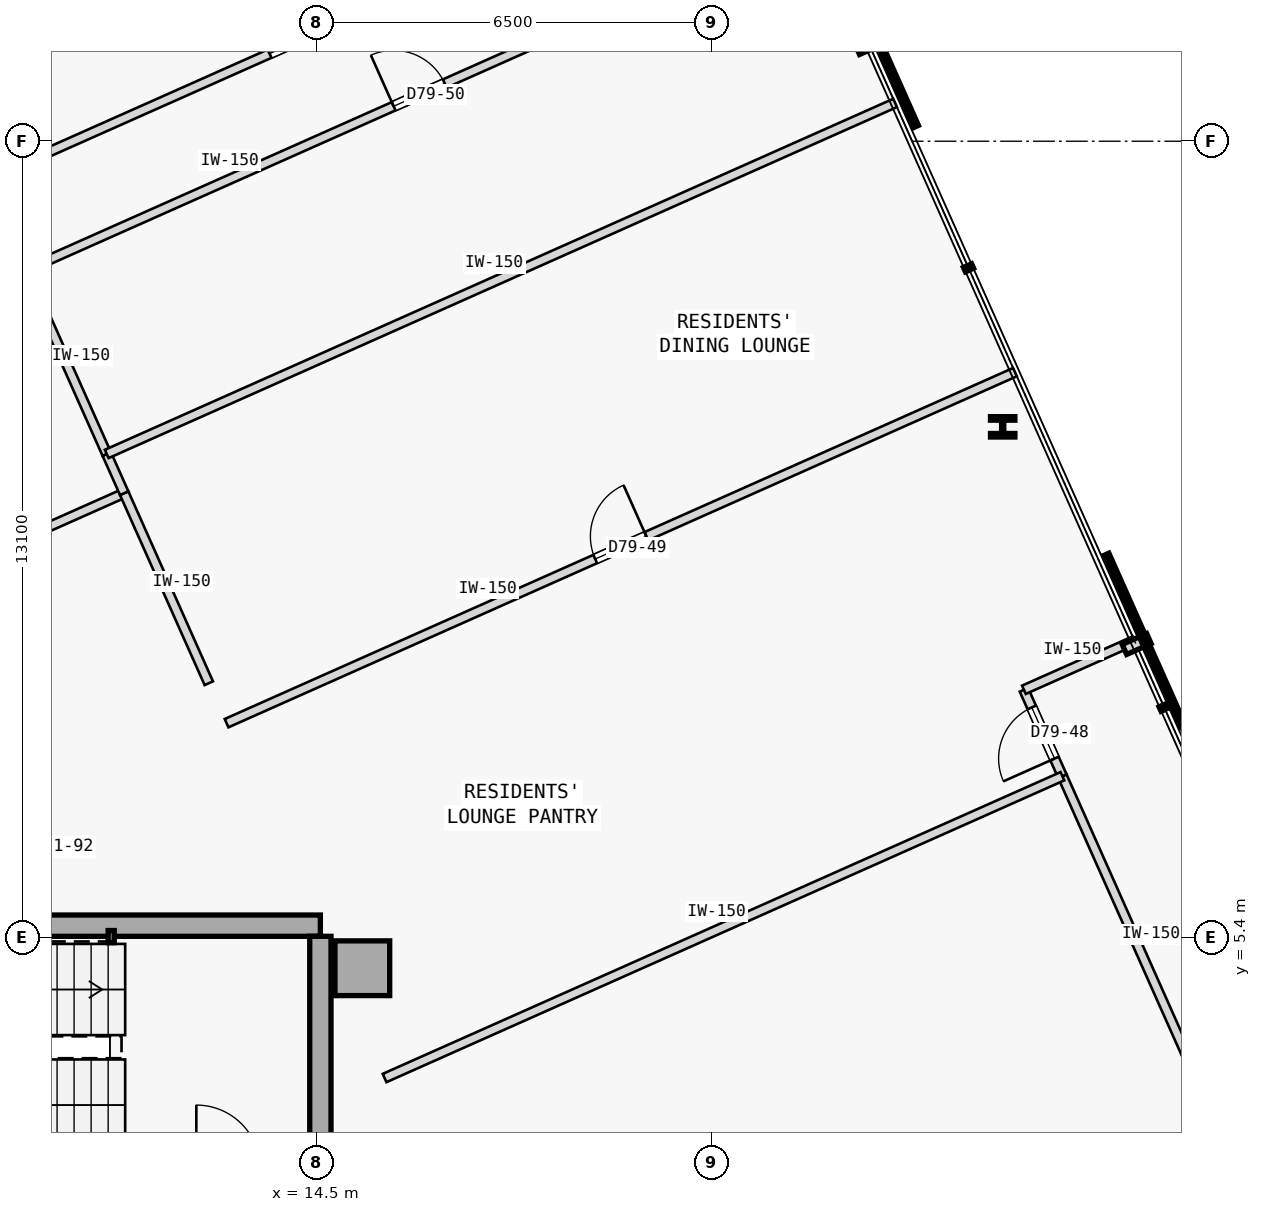
"""IFC4 building model, lengths in metres.
Left out: names, types, materials, properties, quantities, classifications, styles, units other than length and angle.
Written with IfcOpenShell. Run it as: python <this file> out.ifc"""

import sys

from ifc_helpers import new_model, si_unit, direction, frame, frame_2d, origin, origin_2d, place, context, subcontext, project, spatial, rectangle, hollow_rectangle, i_section, extrude, element, fill, save


model = new_model("IFC4")
c1 = context("Model", 3, precision=1e-05, world=origin(), true_north=direction((0.0, 1.0)))
c2 = subcontext(c1, "Body", "Model", "MODEL_VIEW")
j1 = project(units=[si_unit("LENGTHUNIT", "METRE"), si_unit("PLANEANGLEUNIT", "RADIAN")], contexts=[c1])
p1 = place(None, origin())
s1 = spatial("IfcSite", under=j1, at=p1, CompositionType="ELEMENT")
p2 = place(p1, origin())
s2 = spatial("IfcBuilding", under=s1, at=p2, CompositionType="ELEMENT")
p3 = place(p2, frame((0.0, 0.0, 295.3)))
s3 = spatial("IfcBuildingStorey", under=s2, at=p3, CompositionType="ELEMENT", Elevation=295.3)
p4 = place(p3, frame((15.25, 4.9, 0.0), z_axis=(0.0, 0.0, 1.0), x_axis=(1.0, 0.0, 0.0)))
e1 = element("IfcColumn", 1, at=p4, inside=s3, PredefinedType="COLUMN", context=c2, shape_type="SweptSolid", body=[
    extrude(rectangle(XDim=0.9, YDim=0.9, at=origin_2d()), origin(), (0.0, 0.0, 1.0), 3.35),
])
p5 = place(p3, frame((3.15, 5.6, 0.0), z_axis=(0.0, 0.0, 1.0), x_axis=(1.0, 0.0, 0.0)))
e2 = element("IfcWall", 2, at=p5, inside=s3, PredefinedType="SHEAR", context=c2, shape_type="SweptSolid", body=[
    extrude(rectangle(XDim=11.41, YDim=0.35, at=frame_2d((5.705, 0.0))), origin(), (0.0, 0.0, 1.0), 3.125),
])
p6 = place(p3, frame((14.56, -5.425, 0.0), z_axis=(0.0, 0.0, 1.0), x_axis=(0.0, 1.0, 0.0)))
e3 = element("IfcWall", 3, at=p6, inside=s3, PredefinedType="SHEAR", context=c2, shape_type="SweptSolid", body=[
    extrude(rectangle(XDim=10.85, YDim=0.35, at=frame_2d((5.425, 0.0))), origin(), (0.0, 0.0, 1.0), 3.125),
])
p7 = place(p3, frame((11.12, 5.42, 0.0), z_axis=(0.0, 0.0, 1.0), x_axis=(1.0, 0.0, 0.0)))
e4 = element("IfcColumn", 4, at=p7, inside=s3, PredefinedType="COLUMN", context=c2, shape_type="SweptSolid", body=[
    extrude(hollow_rectangle(XDim=0.1, YDim=0.2, WallThickness=0.008, at=origin_2d()), origin(), (0.0, 0.0, 1.0), 3.35),
])
p8 = place(p3, frame((25.781, 13.803, 0.0), z_axis=(0.0, 0.0, 1.0), x_axis=(1.0, 0.0, 0.0)))
e5 = element("IfcColumn", 5, at=p8, inside=s3, PredefinedType="COLUMN", context=c2, shape_type="SweptSolid", body=[
    extrude(i_section(OverallWidth=0.401, OverallDepth=0.335, WebThickness=0.036, FlangeThickness=0.058, FilletRadius=0.015, at=origin_2d()), origin(), (0.0, 0.0, 1.0), 3.35),
])
p9 = place(p3, frame((6.31, 16.638, 0.0), z_axis=(0.0, 0.0, 1.0), x_axis=(0.913550659227, 0.406724959925, 0.0)))
e6 = element("IfcWall", 6, at=p9, inside=s3, PredefinedType="PARTITIONING", context=c2, shape_type="SweptSolid", body=[
    extrude(rectangle(XDim=17.185, YDim=0.15, at=frame_2d((8.592, 0.0))), origin(), (0.0, 0.0, 1.0), 3.125),
])
p10 = place(p9, frame((8.117, 0.0, 0.0)))
e7 = element("IfcOpeningElement", 7, at=p10, cuts=e6, PredefinedType="OPENING", context=c2, shape_type="SweptSolid", body=[
    extrude(rectangle(XDim=0.95, YDim=2.15, at=frame_2d((0.475, 1.075))), frame((0.0, 0.085, 0.0), z_axis=(0.0, -1.0, 0.0), x_axis=(1.0, 0.0, 0.0)), (0.0, 0.0, 1.0), 0.17),
])
p11 = place(p3, frame((29.809, 1.216, 0.0), z_axis=(0.0, 0.0, 1.0), x_axis=(-0.406719136744, 0.913553251763, 0.0)))
e8 = element("IfcWall", 8, at=p11, inside=s3, PredefinedType="PARTITIONING", context=c2, shape_type="SweptSolid", body=[
    extrude(rectangle(XDim=7.489, YDim=0.15, at=frame_2d((3.745, 0.0))), origin(), (0.0, 0.0, 1.0), 3.125),
])
p12 = place(p3, frame((26.763, 8.057, 0.0), z_axis=(0.0, 0.0, 1.0), x_axis=(-0.406851688687, 0.913494227356, 0.0)))
e9 = element("IfcWall", 9, at=p12, inside=s3, PredefinedType="PARTITIONING", context=c2, shape_type="SweptSolid", body=[
    extrude(rectangle(XDim=1.556, YDim=0.15, at=frame_2d((0.778, 0.0))), origin(), (0.0, 0.0, 1.0), 3.125),
])
p13 = place(p12, frame((0.318, 0.0, 0.0)))
e10 = element("IfcOpeningElement", 10, at=p13, cuts=e9, PredefinedType="OPENING", context=c2, shape_type="SweptSolid", body=[
    extrude(rectangle(XDim=0.92, YDim=2.15, at=frame_2d((0.46, 1.075))), frame((0.0, 0.085, 0.0), z_axis=(0.0, -1.0, 0.0), x_axis=(1.0, 0.0, 0.0)), (0.0, 0.0, 1.0), 0.17),
])
p14 = place(p3, frame((26.13, 9.479, 0.0), z_axis=(0.0, 0.0, 1.0), x_axis=(0.913573626813, 0.406673368186, 0.0)))
e11 = element("IfcWall", 11, at=p14, inside=s3, PredefinedType="PARTITIONING", context=c2, shape_type="SweptSolid", body=[
    extrude(rectangle(XDim=1.99, YDim=0.15, at=frame_2d((0.995, 0.0))), origin(), (0.0, 0.0, 1.0), 3.125),
])
p15 = place(p3, frame((9.703, 16.375, 0.0), z_axis=(0.0, 0.0, 1.0), x_axis=(0.913544622417, 0.406738519018, 0.0)))
e12 = element("IfcWall", 12, at=p15, inside=s3, PredefinedType="PARTITIONING", context=c2, shape_type="SweptSolid", body=[
    extrude(rectangle(XDim=14.192, YDim=0.15, at=frame_2d((7.096, 0.0))), origin(), (0.0, 0.0, 1.0), 3.125),
])
p16 = place(p15, frame((6.636, 0.0, 0.0)))
e13 = element("IfcOpeningElement", 13, at=p16, cuts=e12, PredefinedType="OPENING", context=c2, shape_type="SweptSolid", body=[
    extrude(rectangle(XDim=0.92, YDim=2.15, at=frame_2d((0.46, 1.075))), frame((0.0, 0.085, 0.0), z_axis=(0.0, -1.0, 0.0), x_axis=(1.0, 0.0, 0.0)), (0.0, 0.0, 1.0), 0.17),
])
p17 = place(p3, frame((3.7, 9.313, 0.0), z_axis=(0.0, 0.0, 1.0), x_axis=(0.913545080962, 0.406737489112, 0.0)))
e14 = element("IfcWall", 14, at=p17, inside=s3, PredefinedType="PARTITIONING", context=c2, shape_type="SweptSolid", body=[
    extrude(rectangle(XDim=8.356, YDim=0.15, at=frame_2d((4.178, 0.0))), origin(), (0.0, 0.0, 1.0), 3.125),
])
p18 = place(p3, frame((12.725, 9.587, 0.0), z_axis=(0.0, 0.0, 1.0), x_axis=(-0.406714462948, 0.913555332549, 0.0)))
e15 = element("IfcWall", 15, at=p18, inside=s3, PredefinedType="PARTITIONING", context=c2, shape_type="SweptSolid", body=[
    extrude(rectangle(XDim=3.421, YDim=0.15, at=frame_2d((1.71, 0.0))), origin(), (0.0, 0.0, 1.0), 3.125),
])
p19 = place(p3, frame((11.334, 12.712, 0.0), z_axis=(0.0, 0.0, 1.0), x_axis=(-0.40694029237, 0.913454759934, 0.0)))
e16 = element("IfcWall", 16, at=p19, inside=s3, PredefinedType="PARTITIONING", context=c2, shape_type="SweptSolid", body=[
    extrude(rectangle(XDim=0.706, YDim=0.15, at=frame_2d((0.353, 0.0))), origin(), (0.0, 0.0, 1.0), 3.125),
])
p20 = place(p3, frame((11.046, 13.357, 0.0), z_axis=(0.0, 0.0, 1.0), x_axis=(-0.406714303965, 0.913555403328, 0.0)))
e17 = element("IfcWall", 17, at=p20, inside=s3, PredefinedType="PARTITIONING", context=c2, shape_type="SweptSolid", body=[
    extrude(rectangle(XDim=3.304, YDim=0.15, at=frame_2d((1.652, 0.0))), origin(), (0.0, 0.0, 1.0), 3.125),
])
p21 = place(p3, frame((15.616, 3.094, 0.0), z_axis=(0.0, 0.0, 1.0), x_axis=(0.913550635989, 0.40672501212, 0.0)))
e18 = element("IfcWall", 18, at=p21, inside=s3, PredefinedType="PARTITIONING", context=c2, shape_type="SweptSolid", body=[
    extrude(rectangle(XDim=12.202, YDim=0.15, at=frame_2d((6.101, 0.0))), origin(), (0.0, 0.0, 1.0), 3.125),
])
p22 = place(p3, frame((13.018, 8.93, 0.0), z_axis=(0.0, 0.0, 1.0), x_axis=(0.913551014388, 0.406724162191, 0.0)))
e19 = element("IfcWall", 19, at=p22, inside=s3, PredefinedType="PARTITIONING", context=c2, shape_type="SweptSolid", body=[
    extrude(rectangle(XDim=14.192, YDim=0.15, at=frame_2d((7.096, 0.0))), origin(), (0.0, 0.0, 1.0), 3.125),
])
p23 = place(p22, frame((6.636, 0.0, 0.0)))
e20 = element("IfcOpeningElement", 20, at=p23, cuts=e19, PredefinedType="OPENING", context=c2, shape_type="SweptSolid", body=[
    extrude(rectangle(XDim=0.92, YDim=2.15, at=frame_2d((0.46, 1.075))), frame((0.0, 0.085, 0.0), z_axis=(0.0, -1.0, 0.0), x_axis=(1.0, 0.0, 0.0)), (0.0, 0.0, 1.0), 0.17),
])
p24 = place(p3, frame((11.046, 13.357, 0.0), z_axis=(0.0, 0.0, 1.0), x_axis=(0.913553860075, 0.406717770379, 0.0)))
e21 = element("IfcWall", 21, at=p24, inside=s3, PredefinedType="PARTITIONING", context=c2, shape_type="SweptSolid", body=[
    extrude(rectangle(XDim=14.192, YDim=0.15, at=frame_2d((7.096, 0.0))), origin(), (0.0, 0.0, 1.0), 3.125),
])
p25 = place(p10, origin())
e22 = element("IfcDoor", 22, at=p25, inside=s3, OperationType="SINGLE_SWING_LEFT", PredefinedType="DOOR", context=c2, shape_type="SweptSolid", body=[
    extrude(rectangle(XDim=0.95, YDim=2.15, at=frame_2d((0.475, 1.075))), frame((0.0, 0.025, 0.0), z_axis=(0.0, -1.0, 0.0), x_axis=(1.0, 0.0, 0.0)), (0.0, 0.0, 1.0), 0.05),
])
fill(e7, e22)
p26 = place(p13, origin())
e23 = element("IfcDoor", 23, at=p26, inside=s3, OperationType="SINGLE_SWING_LEFT", PredefinedType="DOOR", context=c2, shape_type="SweptSolid", body=[
    extrude(rectangle(XDim=0.92, YDim=2.15, at=frame_2d((0.46, 1.075))), frame((0.0, 0.025, 0.0), z_axis=(0.0, -1.0, 0.0), x_axis=(1.0, 0.0, 0.0)), (0.0, 0.0, 1.0), 0.05),
])
fill(e10, e23)
p27 = place(p23, origin())
e24 = element("IfcDoor", 24, at=p27, inside=s3, OperationType="SINGLE_SWING_RIGHT", PredefinedType="DOOR", context=c2, shape_type="SweptSolid", body=[
    extrude(rectangle(XDim=0.92, YDim=2.15, at=frame_2d((0.46, 1.075))), frame((0.0, 0.025, 0.0), z_axis=(0.0, -1.0, 0.0), x_axis=(1.0, 0.0, 0.0)), (0.0, 0.0, 1.0), 0.05),
])
fill(e20, e24)
p28 = place(p16, origin())
e25 = element("IfcDoor", 25, at=p28, inside=s3, OperationType="SINGLE_SWING_LEFT", PredefinedType="DOOR", context=c2, shape_type="SweptSolid", body=[
    extrude(rectangle(XDim=0.92, YDim=2.15, at=frame_2d((0.46, 1.075))), frame((0.0, 0.025, 0.0), z_axis=(0.0, -1.0, 0.0), x_axis=(1.0, 0.0, 0.0)), (0.0, 0.0, 1.0), 0.05),
])
fill(e13, e25)
save(model, sys.argv[1])
